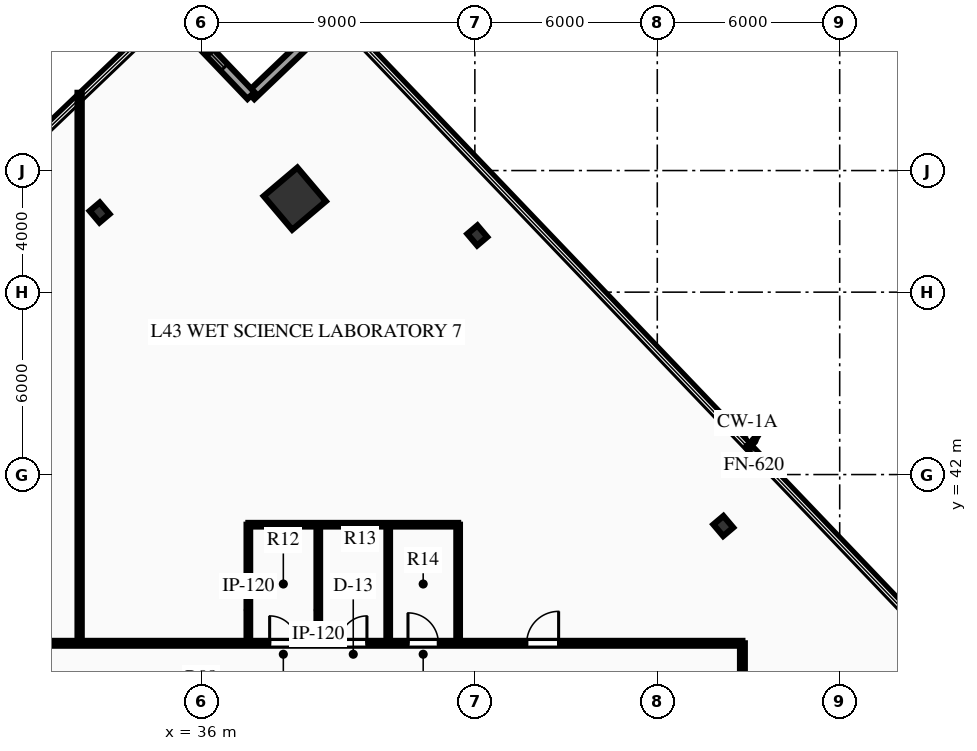
"""IFC4 building model, lengths in metres.
Left out: names, types, materials, properties, quantities, classifications, styles, units other than length and angle.
Written with IfcOpenShell. Run it as: python <this file> out.ifc"""

import sys

from ifc_helpers import new_model, si_unit, direction, frame, frame_2d, origin, origin_2d, place, context, subcontext, project, spatial, rectangle, hollow_rectangle, i_section, extrude, element, fill, save


model = new_model("IFC4")
c1 = context("Model", 3, precision=1e-05, world=origin(), true_north=direction((0.0, 1.0)))
c2 = subcontext(c1, "Body", "Model", "MODEL_VIEW")
j1 = project(units=[si_unit("LENGTHUNIT", "METRE"), si_unit("PLANEANGLEUNIT", "RADIAN")], contexts=[c1])
p1 = place(None, origin())
s1 = spatial("IfcSite", under=j1, at=p1, CompositionType="ELEMENT")
p2 = place(p1, origin())
s2 = spatial("IfcBuilding", under=s1, at=p2, CompositionType="ELEMENT")
p3 = place(p2, frame((0.0, 0.0, 174.45)))
s3 = spatial("IfcBuildingStorey", under=s2, at=p3, CompositionType="ELEMENT", Elevation=174.45)
p4 = place(p3, frame((39.077, 51.075, 0.0), z_axis=(0.0, 0.0, 1.0), x_axis=(0.763232469783, 0.646123979643, 0.0)))
e1 = element("IfcColumn", 1, at=p4, inside=s3, PredefinedType="COLUMN", context=c2, shape_type="SweptSolid", body=[
    extrude(hollow_rectangle(XDim=1.45, YDim=1.45, WallThickness=0.07, at=origin_2d()), origin(), (0.0, 0.0, 1.0), 3.75),
])
for number, where, z_axis, x_axis in (
    (2, (53.171, 40.307, 0.0), (0.0, 0.0, 1.0), (0.763, 0.646, 0.0)),
    (3, (45.08, 49.865, 0.0), (0.0, 0.0, 1.0), (0.763, 0.646, 0.0)),
    (4, (32.657, 50.619, 0.0), (0.0, 0.0, 1.0), (0.763, 0.646, 0.0)),
):
    element("IfcColumn", number, at=place(p3, frame(where, z_axis=z_axis, x_axis=x_axis)), inside=s3, PredefinedType="COLUMN", context=c2, shape_type="SweptSolid", body=[
        extrude(i_section(OverallWidth=0.432, OverallDepth=0.498, WebThickness=0.056, FlangeThickness=0.089, at=origin_2d()), origin(), (0.0, 0.0, 1.0), 3.75),
    ])
p5 = place(p3, frame((37.636, 54.467, 0.0), z_axis=(0.0, 0.0, 1.0), x_axis=(0.722977141356, 0.690871951288, 0.0)))
e5 = element("IfcWall", 5, at=p5, inside=s3, PredefinedType="STANDARD", context=c2, shape_type="SweptSolid", body=[
    extrude(rectangle(XDim=4.0, YDim=0.32, at=frame_2d((2.0, 0.0))), origin(), (0.0, 0.0, 1.0), 3.46),
])
p6 = place(p3, frame((34.873, 57.358, 0.0), z_axis=(0.0, 0.0, 1.0), x_axis=(0.690871951288, -0.722977141356, 0.0)))
e6 = element("IfcWall", 6, at=p6, inside=s3, PredefinedType="STANDARD", context=c2, shape_type="SweptSolid", body=[
    extrude(rectangle(XDim=4.0, YDim=0.32, at=frame_2d((2.0, 0.0))), origin(), (0.0, 0.0, 1.0), 3.46),
])
p7 = place(p6, frame((1.275, 0.0, 0.85)))
e7 = element("IfcOpeningElement", 7, at=p7, cuts=e6, PredefinedType="OPENING", context=c2, shape_type="SweptSolid", body=[
    extrude(rectangle(XDim=1.45, YDim=2.05, at=frame_2d((0.725, 1.025))), frame((0.0, 0.17, 0.0), z_axis=(0.0, -1.0, 0.0), x_axis=(1.0, 0.0, 0.0)), (0.0, 0.0, 1.0), 0.34),
])
p8 = place(p3, frame((18.2, 36.45, 0.0), z_axis=(0.0, 0.0, 1.0), x_axis=(1.0, 0.0, 0.0)))
e8 = element("IfcWall", 8, at=p8, inside=s3, PredefinedType="PARTITIONING", context=c2, shape_type="SweptSolid", body=[
    extrude(rectangle(XDim=35.6, YDim=0.16, at=frame_2d((17.8, 0.0))), origin(), (0.0, 0.0, 1.0), 3.46),
])
p9 = place(p8, frame((20.05, 0.0, 0.0)))
e9 = element("IfcOpeningElement", 9, at=p9, cuts=e8, PredefinedType="OPENING", context=c2, shape_type="SweptSolid", body=[
    extrude(rectangle(XDim=0.9, YDim=2.15, at=frame_2d((0.45, 1.075))), frame((0.0, 0.09, 0.0), z_axis=(0.0, -1.0, 0.0), x_axis=(1.0, 0.0, 0.0)), (0.0, 0.0, 1.0), 0.18),
])
p10 = place(p8, frame((22.35, 0.0, 0.0)))
e10 = element("IfcOpeningElement", 10, at=p10, cuts=e8, PredefinedType="OPENING", context=c2, shape_type="SweptSolid", body=[
    extrude(rectangle(XDim=0.9, YDim=2.15, at=frame_2d((0.45, 1.075))), frame((0.0, 0.09, 0.0), z_axis=(0.0, -1.0, 0.0), x_axis=(1.0, 0.0, 0.0)), (0.0, 0.0, 1.0), 0.18),
])
p11 = place(p8, frame((24.6, 0.0, 0.0)))
e11 = element("IfcOpeningElement", 11, at=p11, cuts=e8, PredefinedType="OPENING", context=c2, shape_type="SweptSolid", body=[
    extrude(rectangle(XDim=1.0, YDim=2.15, at=frame_2d((0.5, 1.075))), frame((0.0, 0.09, 0.0), z_axis=(0.0, -1.0, 0.0), x_axis=(1.0, 0.0, 0.0)), (0.0, 0.0, 1.0), 0.18),
])
p12 = place(p8, frame((1.757, 0.0, 0.0)))
e12 = element("IfcOpeningElement", 12, at=p12, cuts=e8, PredefinedType="OPENING", context=c2, shape_type="SweptSolid", body=[
    extrude(rectangle(XDim=1.05, YDim=2.15, at=frame_2d((0.525, 1.075))), frame((0.0, 0.09, 0.0), z_axis=(0.0, -1.0, 0.0), x_axis=(1.0, 0.0, 0.0)), (0.0, 0.0, 1.0), 0.18),
])
p13 = place(p8, frame((11.155, 0.0, 0.0)))
e13 = element("IfcOpeningElement", 13, at=p13, cuts=e8, PredefinedType="OPENING", context=c2, shape_type="SweptSolid", body=[
    extrude(rectangle(XDim=1.05, YDim=2.15, at=frame_2d((0.525, 1.075))), frame((0.0, 0.09, 0.0), z_axis=(0.0, -1.0, 0.0), x_axis=(1.0, 0.0, 0.0)), (0.0, 0.0, 1.0), 0.18),
])
p14 = place(p8, frame((28.505, 0.0, 0.0)))
e14 = element("IfcOpeningElement", 14, at=p14, cuts=e8, PredefinedType="OPENING", context=c2, shape_type="SweptSolid", body=[
    extrude(rectangle(XDim=1.05, YDim=2.15, at=frame_2d((0.525, 1.075))), frame((0.0, 0.09, 0.0), z_axis=(0.0, -1.0, 0.0), x_axis=(1.0, 0.0, 0.0)), (0.0, 0.0, 1.0), 0.18),
])
p15 = place(p3, frame((53.8, 34.15, 0.0), z_axis=(0.0, 0.0, 1.0), x_axis=(0.0, 1.0, 0.0)))
e15 = element("IfcWall", 15, at=p15, inside=s3, PredefinedType="PARTITIONING", context=c2, shape_type="SweptSolid", body=[
    extrude(rectangle(XDim=2.3, YDim=0.16, at=frame_2d((1.15, 0.0))), origin(), (0.0, 0.0, 1.0), 3.46),
])
for number, where, z_axis, x_axis in (
    (16, (37.55, 36.45, 0.0), (0.0, 0.0, 1.0), (0.0, 1.0, 0.0)),
    (17, (39.85, 36.45, 0.0), (0.0, 0.0, 1.0), (0.0, 1.0, 0.0)),
    (18, (42.15, 36.45, 0.0), (0.0, 0.0, 1.0), (0.0, 1.0, 0.0)),
    (19, (44.45, 36.45, 0.0), (0.0, 0.0, 1.0), (0.0, 1.0, 0.0)),
):
    element("IfcWall", number, at=place(p3, frame(where, z_axis=z_axis, x_axis=x_axis)), inside=s3, PredefinedType="PARTITIONING", context=c2, shape_type="SweptSolid", body=[
        extrude(rectangle(XDim=3.9, YDim=0.12, at=frame_2d((1.95, 0.0))), origin(), (0.0, 0.0, 1.0), 3.46),
    ])
p16 = place(p3, frame((37.55, 40.35, 0.0), z_axis=(0.0, 0.0, 1.0), x_axis=(1.0, 0.0, 0.0)))
e20 = element("IfcWall", 20, at=p16, inside=s3, PredefinedType="PARTITIONING", context=c2, shape_type="SweptSolid", body=[
    extrude(rectangle(XDim=6.9, YDim=0.12, at=frame_2d((3.45, 0.0))), origin(), (0.0, 0.0, 1.0), 3.46),
])
p17 = place(p3, frame((32.0, 36.45, 0.0), z_axis=(0.0, 0.0, 1.0), x_axis=(0.0, 1.0, 0.0)))
e21 = element("IfcWall", 21, at=p17, inside=s3, PredefinedType="PARTITIONING", context=c2, shape_type="SweptSolid", body=[
    extrude(rectangle(XDim=18.108, YDim=0.14, at=frame_2d((9.054, 0.0))), origin(), (0.0, 0.0, 1.0), 3.46),
])
p18 = place(p7, origin())
e22 = element("IfcWindow", 22, at=p18, inside=s3, PartitioningType="SINGLE_PANEL", PredefinedType="WINDOW", context=c2, shape_type="SweptSolid", body=[
    extrude(rectangle(XDim=1.45, YDim=2.05, at=frame_2d((0.725, 1.025))), frame((0.0, 0.03, 0.0), z_axis=(0.0, -1.0, 0.0), x_axis=(1.0, 0.0, 0.0)), (0.0, 0.0, 1.0), 0.06),
])
fill(e7, e22)
p19 = place(p9, origin())
e23 = element("IfcDoor", 23, at=p19, inside=s3, OperationType="SINGLE_SWING_LEFT", PredefinedType="DOOR", context=c2, shape_type="SweptSolid", body=[
    extrude(rectangle(XDim=0.9, YDim=2.15, at=frame_2d((0.45, 1.075))), frame((0.0, 0.025, 0.0), z_axis=(0.0, -1.0, 0.0), x_axis=(1.0, 0.0, 0.0)), (0.0, 0.0, 1.0), 0.05),
])
fill(e9, e23)
p20 = place(p10, origin())
e24 = element("IfcDoor", 24, at=p20, inside=s3, OperationType="SINGLE_SWING_RIGHT", PredefinedType="DOOR", context=c2, shape_type="SweptSolid", body=[
    extrude(rectangle(XDim=0.9, YDim=2.15, at=frame_2d((0.45, 1.075))), frame((0.0, 0.025, 0.0), z_axis=(0.0, -1.0, 0.0), x_axis=(1.0, 0.0, 0.0)), (0.0, 0.0, 1.0), 0.05),
])
fill(e10, e24)
p21 = place(p11, origin())
e25 = element("IfcDoor", 25, at=p21, inside=s3, OperationType="SINGLE_SWING_LEFT", PredefinedType="DOOR", context=c2, shape_type="SweptSolid", body=[
    extrude(rectangle(XDim=1.0, YDim=2.15, at=frame_2d((0.5, 1.075))), frame((0.0, 0.025, 0.0), z_axis=(0.0, -1.0, 0.0), x_axis=(1.0, 0.0, 0.0)), (0.0, 0.0, 1.0), 0.05),
])
fill(e11, e25)
p22 = place(p14, origin())
e26 = element("IfcDoor", 26, at=p22, inside=s3, OperationType="SINGLE_SWING_RIGHT", PredefinedType="DOOR", context=c2, shape_type="SweptSolid", body=[
    extrude(rectangle(XDim=1.05, YDim=2.15, at=frame_2d((0.525, 1.075))), frame((0.0, 0.025, 0.0), z_axis=(0.0, -1.0, 0.0), x_axis=(1.0, 0.0, 0.0)), (0.0, 0.0, 1.0), 0.05),
])
fill(e14, e26)
save(model, sys.argv[1])
